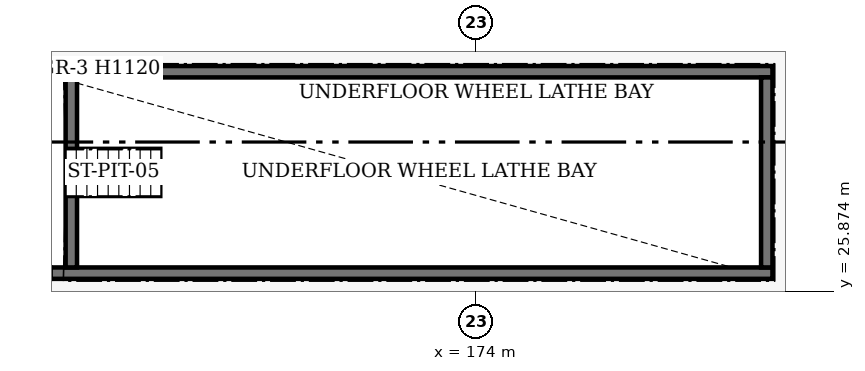
"""IFC4 building model, lengths in metres.
Left out: names, types, materials, properties, quantities, classifications, styles, units other than length and angle.
Written with IfcOpenShell. Run it as: python <this file> out.ifc"""

import sys

from ifc_helpers import new_model, si_unit, direction, frame, frame_2d, origin, place, context, subcontext, project, spatial, rectangle, extrude, element, save


model = new_model("IFC4")
c1 = context("Model", 3, precision=1e-05, world=origin(), true_north=direction((0.0, 1.0)))
c2 = subcontext(c1, "Body", "Model", "MODEL_VIEW")
j1 = project(units=[si_unit("LENGTHUNIT", "METRE"), si_unit("PLANEANGLEUNIT", "RADIAN")], contexts=[c1])
p1 = place(None, origin())
s1 = spatial("IfcSite", under=j1, at=p1, CompositionType="ELEMENT")
p2 = place(p1, origin())
s2 = spatial("IfcBuilding", under=s1, at=p2, CompositionType="ELEMENT")
p3 = place(p2, origin())
s3 = spatial("IfcBuildingStorey", under=s2, at=p3, CompositionType="ELEMENT", Elevation=0.0)
for number, where, z_axis, x_axis in (
    (1, (162.8, 26.35, -1.675), (0.0, 0.0, 1.0), (1.0, 0.0, 0.0)),
    (2, (162.8, 31.65, -1.675), (0.0, 0.0, 1.0), (1.0, 0.0, 0.0)),
):
    element("IfcWall", number, at=place(p3, frame(where, z_axis=z_axis, x_axis=x_axis)), inside=s3, PredefinedType="USERDEFINED", context=c2, shape_type="SweptSolid", body=[
        extrude(rectangle(XDim=19.0, YDim=0.3, at=frame_2d((9.5, 0.0))), origin(), (0.0, 0.0, 1.0), 1.675),
    ])
p4 = place(p3, frame((163.35, 26.5, -1.675), z_axis=(0.0, 0.0, 1.0), x_axis=(0.0, 1.0, 0.0)))
e3 = element("IfcWall", 3, at=p4, inside=s3, PredefinedType="USERDEFINED", context=c2, shape_type="SweptSolid", body=[
    extrude(rectangle(XDim=5.0, YDim=0.3, at=frame_2d((2.5, 0.0))), origin(), (0.0, 0.0, 1.0), 1.455),
])
p5 = place(p3, frame((181.65, 26.5, -1.675), z_axis=(0.0, 0.0, 1.0), x_axis=(0.0, 1.0, 0.0)))
e4 = element("IfcWall", 4, at=p5, inside=s3, PredefinedType="USERDEFINED", context=c2, shape_type="SweptSolid", body=[
    extrude(rectangle(XDim=5.0, YDim=0.3, at=frame_2d((2.5, 0.0))), origin(), (0.0, 0.0, 1.0), 1.675),
])
save(model, sys.argv[1])
